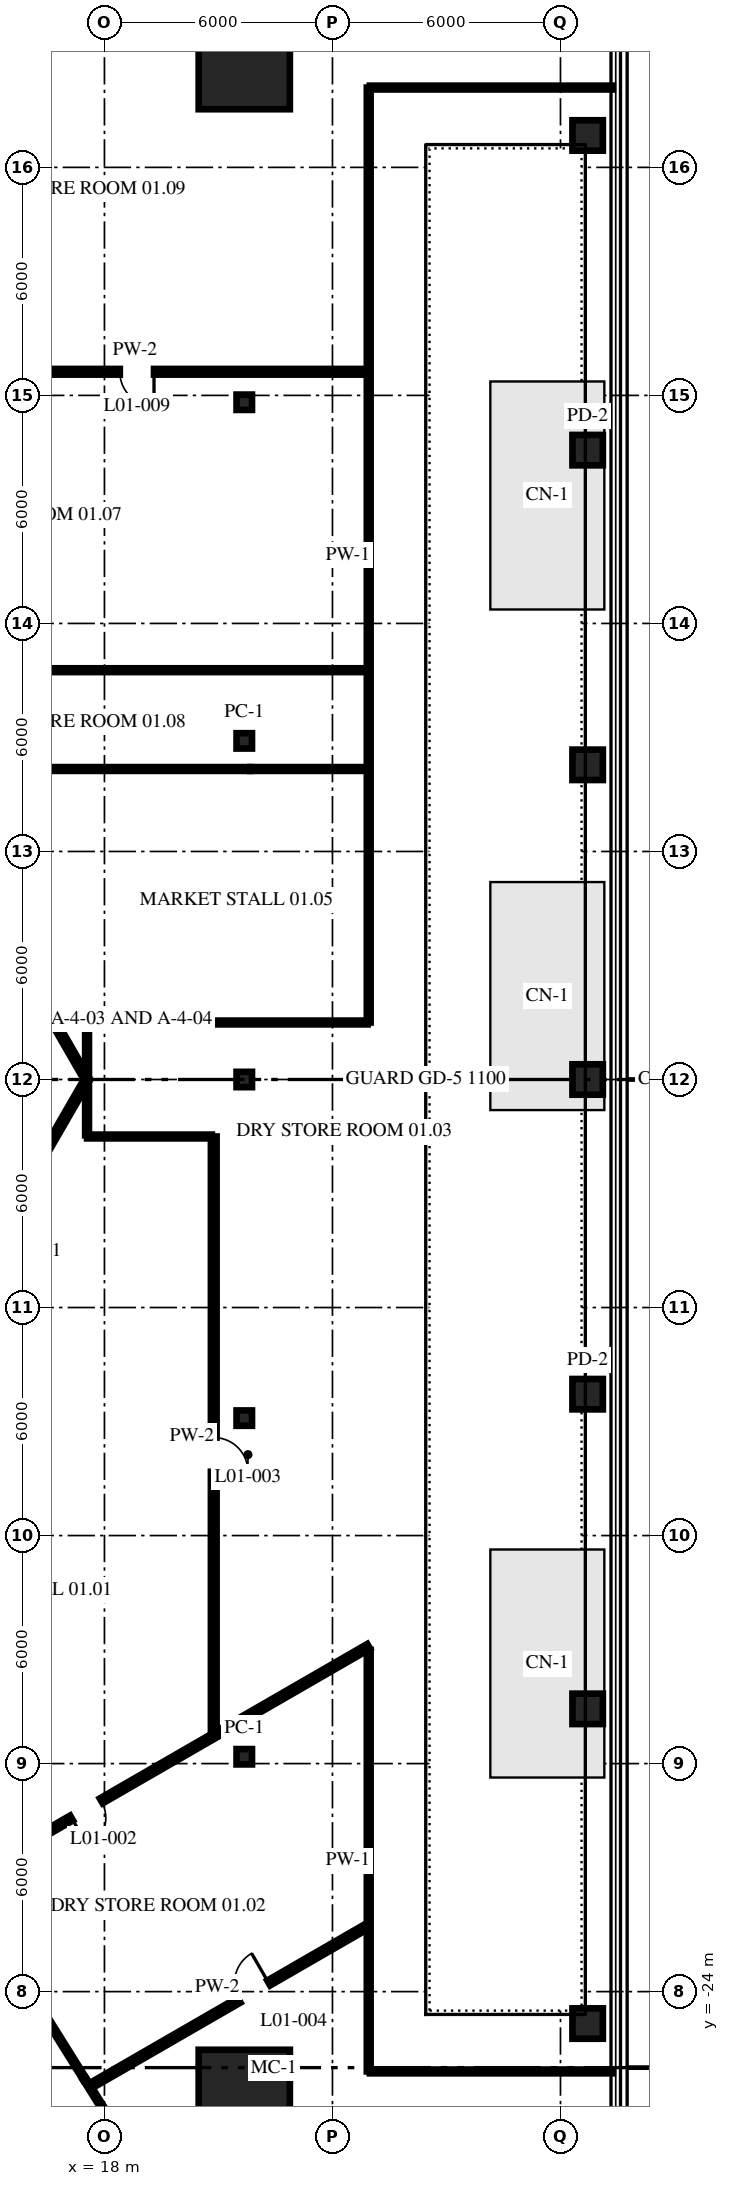
"""IFC4 building model, lengths in metres.
Left out: names, types, materials, properties, quantities, classifications, styles, units other than length and angle.
Written with IfcOpenShell. Run it as: python <this file> out.ifc"""

import sys

from ifc_helpers import new_model, si_unit, direction, frame, frame_2d, origin, origin_2d, place, context, subcontext, project, spatial, rectangle, i_section, extrude, source, transform, mapped, element, fill, save


model = new_model("IFC4")
c1 = context("Model", 3, precision=1e-05, world=origin(), true_north=direction((0.0, 1.0)))
c2 = subcontext(c1, "Body", "Model", "MODEL_VIEW")
j1 = project(units=[si_unit("LENGTHUNIT", "METRE"), si_unit("PLANEANGLEUNIT", "RADIAN")], contexts=[c1])
p1 = place(None, origin())
s1 = spatial("IfcSite", under=j1, at=p1, CompositionType="ELEMENT")
p2 = place(p1, origin())
s2 = spatial("IfcBuilding", under=s1, at=p2, CompositionType="ELEMENT")
p3 = place(p2, frame((0.0, 0.0, 7.0)))
s3 = spatial("IfcBuildingStorey", under=s2, at=p3, CompositionType="ELEMENT", Elevation=7.0)
m1 = source(origin(), c2, "Body", "SweptSolid", [
    extrude(rectangle(XDim=2.4, YDim=2.4, at=origin_2d()), origin(), (0.0, 0.0, 1.0), 4.5),
])
p4 = place(p3, frame((21.679, -26.73, 0.0), z_axis=(0.0, 0.0, 1.0), x_axis=(0.0, 1.0, 0.0)))
e1 = element("IfcColumn", 1, at=p4, inside=s3, PredefinedType="COLUMN", context=c2, shape_type="MappedRepresentation", body=[
    mapped(m1, transform((0.0, 0.0, 0.0), scale=1.0)),
])
m2 = source(origin(), c2, "Body", "SweptSolid", [
    extrude(i_section(OverallWidth=0.404, OverallDepth=0.406, WebThickness=0.027, FlangeThickness=0.044, at=origin_2d()), origin(), (0.0, 0.0, 1.0), 4.5),
])
for number, where, z_axis, x_axis in (
    (2, (21.679, -17.82, 0.0), (0.0, 0.0, 1.0), (0.0, 1.0, 0.0)),
    (3, (21.679, -8.91, 0.0), (0.0, 0.0, 1.0), (0.0, 1.0, 0.0)),
    (4, (21.679, 0.0, 0.0), (0.0, 0.0, 1.0), (0.0, 1.0, 0.0)),
    (5, (21.679, 8.91, 0.0), (0.0, 0.0, 1.0), (0.0, 1.0, 0.0)),
    (6, (21.679, 17.82, 0.0), (0.0, 0.0, 1.0), (0.0, 1.0, 0.0)),
):
    element("IfcColumn", number, at=place(p3, frame(where, z_axis=z_axis, x_axis=x_axis)), inside=s3, PredefinedType="COLUMN", context=c2, shape_type="MappedRepresentation", body=[
        mapped(m2, transform((0.0, 0.0, 0.0), scale=1.0)),
    ])
p5 = place(p3, frame((21.679, 26.73, 0.0), z_axis=(0.0, 0.0, 1.0), x_axis=(0.0, 1.0, 0.0)))
e7 = element("IfcColumn", 7, at=p5, inside=s3, PredefinedType="COLUMN", context=c2, shape_type="MappedRepresentation", body=[
    mapped(m1, transform((0.0, 0.0, 0.0), scale=1.0)),
])
m3 = source(origin(), c2, "Body", "SweptSolid", [
    extrude(rectangle(XDim=0.8, YDim=0.8, at=origin_2d()), origin(), (0.0, 0.0, 1.0), 4.5),
])
for number, where, z_axis, x_axis in (
    (8, (30.715, -24.84, 0.0), (0.0, 0.0, 1.0), (0.0, 1.0, 0.0)),
    (9, (30.715, -16.56, 0.0), (0.0, 0.0, 1.0), (0.0, 1.0, 0.0)),
    (10, (30.715, -8.28, 0.0), (0.0, 0.0, 1.0), (0.0, 1.0, 0.0)),
    (11, (30.715, 0.0, 0.0), (0.0, 0.0, 1.0), (0.0, 1.0, 0.0)),
    (12, (30.715, 8.28, 0.0), (0.0, 0.0, 1.0), (0.0, 1.0, 0.0)),
    (13, (30.715, 16.56, 0.0), (0.0, 0.0, 1.0), (0.0, 1.0, 0.0)),
    (14, (30.715, 24.84, 0.0), (0.0, 0.0, 1.0), (0.0, 1.0, 0.0)),
):
    element("IfcColumn", number, at=place(p3, frame(where, z_axis=z_axis, x_axis=x_axis)), inside=s3, PredefinedType="COLUMN", context=c2, shape_type="MappedRepresentation", body=[
        mapped(m3, transform((0.0, 0.0, 0.0), scale=1.0)),
    ])
p6 = place(p3, frame((8.792, 15.156, 0.0), z_axis=(0.0, 0.0, 1.0), x_axis=(0.499996830835, -0.866027233495, 0.0)))
e15 = element("IfcWall", 15, at=p6, inside=s3, PredefinedType="PARTITIONING", context=c2, shape_type="SweptSolid", body=[
    extrude(rectangle(XDim=17.458, YDim=0.15, at=frame_2d((8.729, 0.0))), origin(), (0.0, 0.0, 1.0), 4.3),
])
p7 = place(p6, frame((11.551, 0.0, 0.0)))
e16 = element("IfcOpeningElement", 16, at=p7, cuts=e15, PredefinedType="OPENING", context=c2, shape_type="SweptSolid", body=[
    extrude(rectangle(XDim=2.4, YDim=2.4, at=frame_2d((1.2, 1.2))), frame((0.0, 0.085, 0.0), z_axis=(0.0, -1.0, 0.0), x_axis=(1.0, 0.0, 0.0)), (0.0, 0.0, 1.0), 0.17),
])
p8 = place(p6, frame((2.014, 0.0, 0.0)))
e17 = element("IfcOpeningElement", 17, at=p8, cuts=e15, PredefinedType="OPENING", context=c2, shape_type="SweptSolid", body=[
    extrude(rectangle(XDim=0.9, YDim=2.1, at=frame_2d((0.45, 1.05))), frame((0.0, 0.085, 0.0), z_axis=(0.0, -1.0, 0.0), x_axis=(1.0, 0.0, 0.0)), (0.0, 0.0, 1.0), 0.17),
])
p9 = place(p6, frame((6.117, 0.0, 0.0)))
e18 = element("IfcOpeningElement", 18, at=p9, cuts=e15, PredefinedType="OPENING", context=c2, shape_type="SweptSolid", body=[
    extrude(rectangle(XDim=0.9, YDim=2.1, at=frame_2d((0.45, 1.05))), frame((0.0, 0.085, 0.0), z_axis=(0.0, -1.0, 0.0), x_axis=(1.0, 0.0, 0.0)), (0.0, 0.0, 1.0), 0.17),
])
p10 = place(p3, frame((11.887, -17.349, 0.0), z_axis=(0.0, 0.0, 1.0), x_axis=(0.529793111174, -0.848126912291, 0.0)))
e19 = element("IfcWall", 19, at=p10, inside=s3, PredefinedType="PARTITIONING", context=c2, shape_type="SweptSolid", body=[
    extrude(rectangle(XDim=10.556, YDim=0.1, at=frame_2d((5.278, 0.0))), origin(), (0.0, 0.0, 1.0), 3.543),
])
p11 = place(p3, frame((17.479, -26.302, 0.0), z_axis=(0.0, 0.0, 1.0), x_axis=(0.52978836467, -0.848129877236, 0.0)))
e20 = element("IfcWall", 20, at=p11, inside=s3, PredefinedType="PARTITIONING", context=c2, shape_type="SweptSolid", body=[
    extrude(rectangle(XDim=6.253, YDim=0.1, at=frame_2d((3.127, 0.0))), origin(), (0.0, 0.0, 1.0), 4.3),
])
m4 = source(origin(), c2, "Body", "SweptSolid", [
    extrude(rectangle(XDim=6.395, YDim=0.1, at=frame_2d((3.198, 0.0))), origin(), (0.0, 0.0, 1.0), 4.3),
])
p12 = place(p3, frame((24.984, -26.1, 0.0), z_axis=(0.0, 0.0, 1.0), x_axis=(1.0, 0.0, 0.0)))
e21 = element("IfcWall", 21, at=p12, inside=s3, PredefinedType="PARTITIONING", context=c2, shape_type="MappedRepresentation", body=[
    mapped(m4, transform((0.0, 0.0, 0.0), scale=1.0)),
])
p13 = place(p3, frame((17.542, -1.5, 0.0), z_axis=(0.0, 0.0, 1.0), x_axis=(1.0, 0.0, 0.0)))
e22 = element("IfcWall", 22, at=p13, inside=s3, PredefinedType="PARTITIONING", context=c2, shape_type="SweptSolid", body=[
    extrude(rectangle(XDim=3.284, YDim=0.1, at=frame_2d((1.642, 0.0))), origin(), (0.0, 0.0, 1.0), 4.3),
])
p14 = place(p3, frame((17.542, 1.5, 0.0), z_axis=(0.0, 0.0, 1.0), x_axis=(1.0, 0.0, 0.0)))
e23 = element("IfcWall", 23, at=p14, inside=s3, PredefinedType="PARTITIONING", context=c2, shape_type="SweptSolid", body=[
    extrude(rectangle(XDim=7.382, YDim=0.1, at=frame_2d((3.691, 0.0))), origin(), (0.0, 0.0, 1.0), 4.3),
])
m5 = source(origin(), c2, "Body", "SweptSolid", [
    extrude(rectangle(XDim=8.919, YDim=0.1, at=frame_2d((4.459, 0.0))), origin(), (0.0, 0.0, 1.0), 4.3),
])
p15 = place(p3, frame((12.916, 8.17, 0.0), z_axis=(0.0, 0.0, 1.0), x_axis=(1.0, 0.0, 0.0)))
e24 = element("IfcWall", 24, at=p15, inside=s3, PredefinedType="PARTITIONING", context=c2, shape_type="MappedRepresentation", body=[
    mapped(m5, transform((0.0, 0.0, 0.0), scale=1.0)),
])
p16 = place(p3, frame((21.834, 8.17, 0.0), z_axis=(0.0, 0.0, 1.0), x_axis=(1.0, 0.0, 0.0)))
e25 = element("IfcWall", 25, at=p16, inside=s3, PredefinedType="PARTITIONING", context=c2, shape_type="SweptSolid", body=[
    extrude(rectangle(XDim=3.09, YDim=0.1, at=frame_2d((1.545, 0.0))), origin(), (0.0, 0.0, 1.0), 3.528),
])
p17 = place(p3, frame((11.415, 10.77, 0.0), z_axis=(0.0, 0.0, 1.0), x_axis=(1.0, 0.0, 0.0)))
e26 = element("IfcWall", 26, at=p17, inside=s3, PredefinedType="PARTITIONING", context=c2, shape_type="SweptSolid", body=[
    extrude(rectangle(XDim=13.51, YDim=0.1, at=frame_2d((6.755, 0.0))), origin(), (0.0, 0.0, 1.0), 4.3),
])
p18 = place(p3, frame((12.682, 18.622, 0.0), z_axis=(0.0, 0.0, 1.0), x_axis=(1.0, 0.0, 0.0)))
e27 = element("IfcWall", 27, at=p18, inside=s3, PredefinedType="PARTITIONING", context=c2, shape_type="SweptSolid", body=[
    extrude(rectangle(XDim=12.242, YDim=0.15, at=frame_2d((6.121, 0.0))), origin(), (0.0, 0.0, 1.0), 4.3),
])
p19 = place(p18, frame((5.722, 0.0, 0.0)))
e28 = element("IfcOpeningElement", 28, at=p19, cuts=e27, PredefinedType="OPENING", context=c2, shape_type="SweptSolid", body=[
    extrude(rectangle(XDim=0.9, YDim=2.1, at=frame_2d((0.45, 1.05))), frame((0.0, 0.085, 0.0), z_axis=(0.0, -1.0, 0.0), x_axis=(1.0, 0.0, 0.0)), (0.0, 0.0, 1.0), 0.17),
])
p20 = place(p3, frame((24.984, 26.1, 0.0), z_axis=(0.0, 0.0, 1.0), x_axis=(1.0, 0.0, 0.0)))
e29 = element("IfcWall", 29, at=p20, inside=s3, PredefinedType="PARTITIONING", context=c2, shape_type="MappedRepresentation", body=[
    mapped(m4, transform((0.0, 0.0, 0.0), scale=1.0)),
])
p21 = place(p3, frame((17.628, -26.483, 0.0), z_axis=(0.0, 0.0, 1.0), x_axis=(0.866027414801, 0.499996516801, 0.0)))
e30 = element("IfcWall", 30, at=p21, inside=s3, PredefinedType="PARTITIONING", context=c2, shape_type="SweptSolid", body=[
    extrude(rectangle(XDim=8.379, YDim=0.15, at=frame_2d((4.19, 0.0))), origin(), (0.0, 0.0, 1.0), 4.3),
])
p22 = place(p21, frame((4.52, 0.0, 0.0)))
e31 = element("IfcOpeningElement", 31, at=p22, cuts=e30, PredefinedType="OPENING", context=c2, shape_type="SweptSolid", body=[
    extrude(rectangle(XDim=0.9, YDim=2.1, at=frame_2d((0.45, 1.05))), frame((0.0, 0.085, 0.0), z_axis=(0.0, -1.0, 0.0), x_axis=(1.0, 0.0, 0.0)), (0.0, 0.0, 1.0), 0.17),
])
p23 = place(p3, frame((14.26, -21.092, 0.0), z_axis=(0.0, 0.0, 1.0), x_axis=(0.866027554198, 0.499996275356, 0.0)))
e32 = element("IfcWall", 32, at=p23, inside=s3, PredefinedType="PARTITIONING", context=c2, shape_type="SweptSolid", body=[
    extrude(rectangle(XDim=12.349, YDim=0.15, at=frame_2d((6.174, 0.0))), origin(), (0.0, 0.0, 1.0), 4.3),
])
p24 = place(p23, frame((3.32, 0.0, 0.0)))
e33 = element("IfcOpeningElement", 33, at=p24, cuts=e32, PredefinedType="OPENING", context=c2, shape_type="SweptSolid", body=[
    extrude(rectangle(XDim=0.9, YDim=2.1, at=frame_2d((0.45, 1.05))), frame((0.0, 0.085, 0.0), z_axis=(0.0, -1.0, 0.0), x_axis=(1.0, 0.0, 0.0)), (0.0, 0.0, 1.0), 0.17),
])
p25 = place(p3, frame((7.499, 15.987, 0.0), z_axis=(0.0, 0.0, 1.0), x_axis=(0.529789085059, 0.848129427241, 0.0)))
e34 = element("IfcWall", 34, at=p25, inside=s3, PredefinedType="PARTITIONING", context=c2, shape_type="SweptSolid", body=[
    extrude(rectangle(XDim=20.289, YDim=0.1, at=frame_2d((10.145, 0.0))), origin(), (0.0, 0.0, 1.0), 4.3),
])
p26 = place(p3, frame((8.772, -15.191, 0.0), z_axis=(0.0, 0.0, 1.0), x_axis=(0.499997184852, 0.866027029105, 0.0)))
e35 = element("IfcWall", 35, at=p26, inside=s3, PredefinedType="PARTITIONING", context=c2, shape_type="SweptSolid", body=[
    extrude(rectangle(XDim=17.539, YDim=0.15, at=frame_2d((8.769, 0.0))), origin(), (0.0, 0.0, 1.0), 4.3),
])
p27 = place(p26, frame((11.657, 0.0, 0.0)))
e36 = element("IfcOpeningElement", 36, at=p27, cuts=e35, PredefinedType="OPENING", context=c2, shape_type="SweptSolid", body=[
    extrude(rectangle(XDim=2.4, YDim=2.4, at=frame_2d((1.2, 1.2))), frame((0.0, 0.085, 0.0), z_axis=(0.0, -1.0, 0.0), x_axis=(1.0, 0.0, 0.0)), (0.0, 0.0, 1.0), 0.17),
])
p28 = place(p3, frame((24.954, -26.1, 0.0), z_axis=(0.0, 0.0, 1.0), x_axis=(0.0, 1.0, 0.0)))
e37 = element("IfcWall", 37, at=p28, inside=s3, PredefinedType="PARTITIONING", context=c2, shape_type="SweptSolid", body=[
    extrude(rectangle(XDim=11.093, YDim=0.1, at=frame_2d((5.546, 0.0))), origin(), (0.0, 0.0, 1.0), 4.3),
])
p29 = place(p3, frame((24.954, 1.5, 0.0), z_axis=(0.0, 0.0, 1.0), x_axis=(0.0, 1.0, 0.0)))
e38 = element("IfcWall", 38, at=p29, inside=s3, PredefinedType="PARTITIONING", context=c2, shape_type="SweptSolid", body=[
    extrude(rectangle(XDim=24.6, YDim=0.1, at=frame_2d((12.3, 0.0))), origin(), (0.0, 0.0, 1.0), 4.3),
])
p30 = place(p3, frame((20.876, -17.271, 0.0), z_axis=(0.0, 0.0, 1.0), x_axis=(0.0, 1.0, 0.0)))
e39 = element("IfcWall", 39, at=p30, inside=s3, PredefinedType="PARTITIONING", context=c2, shape_type="SweptSolid", body=[
    extrude(rectangle(XDim=15.771, YDim=0.15, at=frame_2d((7.886, 0.0))), origin(), (0.0, 0.0, 1.0), 4.3),
])
p31 = place(p30, frame((6.95, 0.0, 0.0)))
e40 = element("IfcOpeningElement", 40, at=p31, cuts=e39, PredefinedType="OPENING", context=c2, shape_type="SweptSolid", body=[
    extrude(rectangle(XDim=0.9, YDim=2.1, at=frame_2d((0.45, 1.05))), frame((0.0, 0.085, 0.0), z_axis=(0.0, -1.0, 0.0), x_axis=(1.0, 0.0, 0.0)), (0.0, 0.0, 1.0), 0.17),
])
p32 = place(p3, frame((17.542, -1.47, 0.0), z_axis=(0.0, 0.0, 1.0), x_axis=(0.0, 1.0, 0.0)))
e41 = element("IfcWall", 41, at=p32, inside=s3, PredefinedType="PARTITIONING", context=c2, shape_type="SweptSolid", body=[
    extrude(rectangle(XDim=2.94, YDim=0.1, at=frame_2d((1.47, 0.0))), origin(), (0.0, 0.0, 1.0), 4.3),
])
p33 = place(p24, origin())
e42 = element("IfcDoor", 42, at=p33, inside=s3, OperationType="SINGLE_SWING_RIGHT", PredefinedType="DOOR", context=c2, shape_type="SweptSolid", body=[
    extrude(rectangle(XDim=0.9, YDim=2.1, at=frame_2d((0.45, 1.05))), frame((0.0, 0.025, 0.0), z_axis=(0.0, -1.0, 0.0), x_axis=(1.0, 0.0, 0.0)), (0.0, 0.0, 1.0), 0.05),
])
fill(e33, e42)
p34 = place(p31, origin())
e43 = element("IfcDoor", 43, at=p34, inside=s3, OperationType="SINGLE_SWING_RIGHT", PredefinedType="DOOR", context=c2, shape_type="SweptSolid", body=[
    extrude(rectangle(XDim=0.9, YDim=2.1, at=frame_2d((0.45, 1.05))), frame((0.0, 0.025, 0.0), z_axis=(0.0, -1.0, 0.0), x_axis=(1.0, 0.0, 0.0)), (0.0, 0.0, 1.0), 0.05),
])
fill(e40, e43)
p35 = place(p22, origin())
e44 = element("IfcDoor", 44, at=p35, inside=s3, OperationType="SINGLE_SWING_LEFT", PredefinedType="DOOR", context=c2, shape_type="SweptSolid", body=[
    extrude(rectangle(XDim=0.9, YDim=2.1, at=frame_2d((0.45, 1.05))), frame((0.0, 0.025, 0.0), z_axis=(0.0, -1.0, 0.0), x_axis=(1.0, 0.0, 0.0)), (0.0, 0.0, 1.0), 0.05),
])
fill(e31, e44)
p36 = place(p19, origin())
e45 = element("IfcDoor", 45, at=p36, inside=s3, OperationType="SINGLE_SWING_RIGHT", PredefinedType="DOOR", context=c2, shape_type="SweptSolid", body=[
    extrude(rectangle(XDim=0.9, YDim=2.1, at=frame_2d((0.45, 1.05))), frame((0.0, 0.025, 0.0), z_axis=(0.0, -1.0, 0.0), x_axis=(1.0, 0.0, 0.0)), (0.0, 0.0, 1.0), 0.05),
])
fill(e28, e45)
save(model, sys.argv[1])
